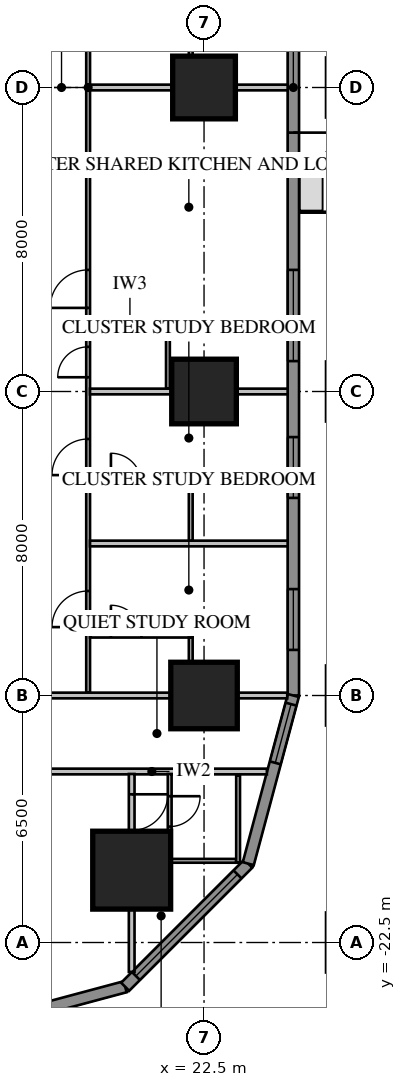
"""IFC4 building model, lengths in metres.
Left out: names, types, materials, properties, quantities, classifications, styles, units other than length and angle.
Written with IfcOpenShell. Run it as: python <this file> out.ifc"""

import sys

from ifc_helpers import new_model, si_unit, direction, frame, frame_2d, origin, origin_2d, place, context, subcontext, project, spatial, rectangle, extrude, element, fill, save


model = new_model("IFC4")
c1 = context("Model", 3, precision=1e-05, world=origin(), true_north=direction((0.0, 1.0)))
c2 = subcontext(c1, "Body", "Model", "MODEL_VIEW")
j1 = project(units=[si_unit("LENGTHUNIT", "METRE"), si_unit("PLANEANGLEUNIT", "RADIAN")], contexts=[c1])
p1 = place(None, origin())
s1 = spatial("IfcSite", under=j1, at=p1, CompositionType="ELEMENT")
p2 = place(p1, origin())
s2 = spatial("IfcBuilding", under=s1, at=p2, CompositionType="ELEMENT")
p3 = place(p2, frame((0.0, 0.0, 23.7)))
s3 = spatial("IfcBuildingStorey", under=s2, at=p3, CompositionType="ELEMENT", Elevation=23.7)
p4 = place(p3, frame((22.5, -16.0, 0.0), z_axis=(0.0, 0.0, 1.0), x_axis=(1.0, 0.0, 0.0)))
e1 = element("IfcColumn", 1, at=p4, inside=s3, PredefinedType="COLUMN", context=c2, shape_type="SweptSolid", body=[
    extrude(rectangle(XDim=1.75, YDim=1.75, at=origin_2d()), origin(), (0.0, 0.0, 1.0), 3.85),
])
p5 = place(p3, frame((22.5, -8.0, 0.0), z_axis=(0.0, 0.0, 1.0), x_axis=(1.0, 0.0, 0.0)))
e2 = element("IfcColumn", 2, at=p5, inside=s3, PredefinedType="COLUMN", context=c2, shape_type="SweptSolid", body=[
    extrude(rectangle(XDim=1.7, YDim=1.7, at=origin_2d()), origin(), (0.0, 0.0, 1.0), 3.85),
])
p6 = place(p3, frame((22.5, 0.0, 0.0), z_axis=(0.0, 0.0, 1.0), x_axis=(1.0, 0.0, 0.0)))
e3 = element("IfcColumn", 3, at=p6, inside=s3, PredefinedType="COLUMN", context=c2, shape_type="SweptSolid", body=[
    extrude(rectangle(XDim=1.65, YDim=1.65, at=origin_2d()), origin(), (0.0, 0.0, 1.0), 3.85),
])
p7 = place(p3, frame((20.596, -20.596, 0.0), z_axis=(0.0, 0.0, 1.0), x_axis=(1.0, 0.0, 0.0)))
e4 = element("IfcColumn", 4, at=p7, inside=s3, PredefinedType="COLUMN", context=c2, shape_type="SweptSolid", body=[
    extrude(rectangle(XDim=2.05, YDim=2.05, at=origin_2d()), origin(), (0.0, 0.0, 1.0), 3.85),
])
p8 = place(p3, frame((24.85, -16.0, 0.0), z_axis=(0.0, 0.0, 1.0), x_axis=(0.0, 1.0, 0.0)))
e5 = element("IfcWall", 5, at=p8, inside=s3, PredefinedType="SOLIDWALL", context=c2, shape_type="SweptSolid", body=[
    extrude(rectangle(XDim=32.0, YDim=0.3, at=frame_2d((16.0, 0.0))), origin(), (0.0, 0.0, 1.0), 3.65),
])
p9 = place(p8, frame((1.2, 0.0, 0.75)))
e6 = element("IfcOpeningElement", 6, at=p9, cuts=e5, PredefinedType="OPENING", context=c2, shape_type="SweptSolid", body=[
    extrude(rectangle(XDim=1.6, YDim=1.8, at=frame_2d((0.8, 0.9))), frame((0.0, 0.17, 0.0), z_axis=(0.0, -1.0, 0.0), x_axis=(1.0, 0.0, 0.0)), (0.0, 0.0, 1.0), 0.34),
])
p10 = place(p8, frame((5.2, 0.0, 0.75)))
e7 = element("IfcOpeningElement", 7, at=p10, cuts=e5, PredefinedType="OPENING", context=c2, shape_type="SweptSolid", body=[
    extrude(rectangle(XDim=1.6, YDim=1.8, at=frame_2d((0.8, 0.9))), frame((0.0, 0.17, 0.0), z_axis=(0.0, -1.0, 0.0), x_axis=(1.0, 0.0, 0.0)), (0.0, 0.0, 1.0), 0.34),
])
p11 = place(p8, frame((17.2, 0.0, 0.75)))
e8 = element("IfcOpeningElement", 8, at=p11, cuts=e5, PredefinedType="OPENING", context=c2, shape_type="SweptSolid", body=[
    extrude(rectangle(XDim=1.6, YDim=1.8, at=frame_2d((0.8, 0.9))), frame((0.0, 0.17, 0.0), z_axis=(0.0, -1.0, 0.0), x_axis=(1.0, 0.0, 0.0)), (0.0, 0.0, 1.0), 0.34),
])
p12 = place(p8, frame((21.2, 0.0, 0.75)))
e9 = element("IfcOpeningElement", 9, at=p12, cuts=e5, PredefinedType="OPENING", context=c2, shape_type="SweptSolid", body=[
    extrude(rectangle(XDim=1.6, YDim=1.8, at=frame_2d((0.8, 0.9))), frame((0.0, 0.17, 0.0), z_axis=(0.0, -1.0, 0.0), x_axis=(1.0, 0.0, 0.0)), (0.0, 0.0, 1.0), 0.34),
])
p13 = place(p8, frame((25.2, 0.0, 0.75)))
e10 = element("IfcOpeningElement", 10, at=p13, cuts=e5, PredefinedType="OPENING", context=c2, shape_type="SweptSolid", body=[
    extrude(rectangle(XDim=1.6, YDim=1.8, at=frame_2d((0.8, 0.9))), frame((0.0, 0.17, 0.0), z_axis=(0.0, -1.0, 0.0), x_axis=(1.0, 0.0, 0.0)), (0.0, 0.0, 1.0), 0.34),
])
p14 = place(p8, frame((29.2, 0.0, 0.75)))
e11 = element("IfcOpeningElement", 11, at=p14, cuts=e5, PredefinedType="OPENING", context=c2, shape_type="SweptSolid", body=[
    extrude(rectangle(XDim=1.6, YDim=1.8, at=frame_2d((0.8, 0.9))), frame((0.0, 0.17, 0.0), z_axis=(0.0, -1.0, 0.0), x_axis=(1.0, 0.0, 0.0)), (0.0, 0.0, 1.0), 0.34),
])
p15 = place(p8, frame((8.8, 0.0, 0.75)))
e12 = element("IfcOpeningElement", 12, at=p15, cuts=e5, PredefinedType="OPENING", context=c2, shape_type="SweptSolid", body=[
    extrude(rectangle(XDim=2.4, YDim=1.8, at=frame_2d((1.2, 0.9))), frame((0.0, 0.17, 0.0), z_axis=(0.0, -1.0, 0.0), x_axis=(1.0, 0.0, 0.0)), (0.0, 0.0, 1.0), 0.34),
])
p16 = place(p8, frame((13.812, 0.0, 0.0)))
e13 = element("IfcOpeningElement", 13, at=p16, cuts=e5, PredefinedType="OPENING", context=c2, shape_type="SweptSolid", body=[
    extrude(rectangle(XDim=1.0, YDim=2.4, at=frame_2d((0.5, 1.2))), frame((0.0, 0.17, 0.0), z_axis=(0.0, -1.0, 0.0), x_axis=(1.0, 0.0, 0.0)), (0.0, 0.0, 1.0), 0.34),
])
p17 = place(p3, frame((16.0, -24.85, 0.0), z_axis=(0.0, 0.0, 1.0), x_axis=(0.965920218567, 0.258839972501, 0.0)))
e14 = element("IfcWall", 14, at=p17, inside=s3, PredefinedType="SOLIDWALL", context=c2, shape_type="SweptSolid", body=[
    extrude(rectangle(XDim=4.581, YDim=0.3, at=frame_2d((2.291, 0.0))), origin(), (0.0, 0.0, 1.0), 3.65),
])
p18 = place(p3, frame((20.425, -23.664, 0.0), z_axis=(0.0, 0.0, 1.0), x_axis=(0.707106781187, 0.707106781187, 0.0)))
e15 = element("IfcWall", 15, at=p18, inside=s3, PredefinedType="SOLIDWALL", context=c2, shape_type="SweptSolid", body=[
    extrude(rectangle(XDim=4.581, YDim=0.3, at=frame_2d((2.291, 0.0))), origin(), (0.0, 0.0, 1.0), 3.65),
])
p19 = place(p18, frame((0.4, 0.0, 0.75)))
e16 = element("IfcOpeningElement", 16, at=p19, cuts=e15, PredefinedType="OPENING", context=c2, shape_type="SweptSolid", body=[
    extrude(rectangle(XDim=3.781, YDim=1.8, at=frame_2d((1.891, 0.9))), frame((0.0, 0.17, 0.0), z_axis=(0.0, -1.0, 0.0), x_axis=(1.0, 0.0, 0.0)), (0.0, 0.0, 1.0), 0.34),
])
p20 = place(p3, frame((23.664, -20.425, 0.0), z_axis=(0.0, 0.0, 1.0), x_axis=(0.258839972501, 0.965920218567, 0.0)))
e17 = element("IfcWall", 17, at=p20, inside=s3, PredefinedType="SOLIDWALL", context=c2, shape_type="SweptSolid", body=[
    extrude(rectangle(XDim=4.581, YDim=0.3, at=frame_2d((2.291, 0.0))), origin(), (0.0, 0.0, 1.0), 3.65),
])
p21 = place(p20, frame((2.746, 0.0, 0.75)))
e18 = element("IfcOpeningElement", 18, at=p21, cuts=e17, PredefinedType="OPENING", context=c2, shape_type="SweptSolid", body=[
    extrude(rectangle(XDim=1.6, YDim=1.8, at=frame_2d((0.8, 0.9))), frame((0.0, 0.17, 0.0), z_axis=(0.0, -1.0, 0.0), x_axis=(1.0, 0.0, 0.0)), (0.0, 0.0, 1.0), 0.34),
])
p22 = place(p3, frame((19.45, -15.925, 0.0), z_axis=(0.0, 0.0, 1.0), x_axis=(0.0, 1.0, 0.0)))
e19 = element("IfcWall", 19, at=p22, inside=s3, PredefinedType="PARTITIONING", context=c2, shape_type="SweptSolid", body=[
    extrude(rectangle(XDim=31.85, YDim=0.1, at=frame_2d((15.925, 0.0))), origin(), (0.0, 0.0, 1.0), 3.65),
])
p23 = place(p22, frame((10.125, 0.0, 0.0)))
e20 = element("IfcOpeningElement", 20, at=p23, cuts=e19, PredefinedType="OPENING", context=c2, shape_type="SweptSolid", body=[
    extrude(rectangle(XDim=1.0, YDim=2.1, at=frame_2d((0.5, 1.05))), frame((0.0, 0.07, 0.0), z_axis=(0.0, -1.0, 0.0), x_axis=(1.0, 0.0, 0.0)), (0.0, 0.0, 1.0), 0.14),
])
p24 = place(p22, frame((8.3, 0.0, 0.0)))
e21 = element("IfcOpeningElement", 21, at=p24, cuts=e19, PredefinedType="OPENING", context=c2, shape_type="SweptSolid", body=[
    extrude(rectangle(XDim=0.8, YDim=2.1, at=frame_2d((0.4, 1.05))), frame((0.0, 0.07, 0.0), z_axis=(0.0, -1.0, 0.0), x_axis=(1.0, 0.0, 0.0)), (0.0, 0.0, 1.0), 0.14),
])
p25 = place(p22, frame((1.725, 0.0, 0.0)))
e22 = element("IfcOpeningElement", 22, at=p25, cuts=e19, PredefinedType="OPENING", context=c2, shape_type="SweptSolid", body=[
    extrude(rectangle(XDim=0.95, YDim=2.1, at=frame_2d((0.475, 1.05))), frame((0.0, 0.07, 0.0), z_axis=(0.0, -1.0, 0.0), x_axis=(1.0, 0.0, 0.0)), (0.0, 0.0, 1.0), 0.14),
])
p26 = place(p22, frame((5.725, 0.0, 0.0)))
e23 = element("IfcOpeningElement", 23, at=p26, cuts=e19, PredefinedType="OPENING", context=c2, shape_type="SweptSolid", body=[
    extrude(rectangle(XDim=0.95, YDim=2.1, at=frame_2d((0.475, 1.05))), frame((0.0, 0.07, 0.0), z_axis=(0.0, -1.0, 0.0), x_axis=(1.0, 0.0, 0.0)), (0.0, 0.0, 1.0), 0.14),
])
p27 = place(p22, frame((17.725, 0.0, 0.0)))
e24 = element("IfcOpeningElement", 24, at=p27, cuts=e19, PredefinedType="OPENING", context=c2, shape_type="SweptSolid", body=[
    extrude(rectangle(XDim=0.95, YDim=2.1, at=frame_2d((0.475, 1.05))), frame((0.0, 0.07, 0.0), z_axis=(0.0, -1.0, 0.0), x_axis=(1.0, 0.0, 0.0)), (0.0, 0.0, 1.0), 0.14),
])
p28 = place(p22, frame((21.725, 0.0, 0.0)))
e25 = element("IfcOpeningElement", 25, at=p28, cuts=e19, PredefinedType="OPENING", context=c2, shape_type="SweptSolid", body=[
    extrude(rectangle(XDim=0.95, YDim=2.1, at=frame_2d((0.475, 1.05))), frame((0.0, 0.07, 0.0), z_axis=(0.0, -1.0, 0.0), x_axis=(1.0, 0.0, 0.0)), (0.0, 0.0, 1.0), 0.14),
])
p29 = place(p22, frame((25.725, 0.0, 0.0)))
e26 = element("IfcOpeningElement", 26, at=p29, cuts=e19, PredefinedType="OPENING", context=c2, shape_type="SweptSolid", body=[
    extrude(rectangle(XDim=0.95, YDim=2.1, at=frame_2d((0.475, 1.05))), frame((0.0, 0.07, 0.0), z_axis=(0.0, -1.0, 0.0), x_axis=(1.0, 0.0, 0.0)), (0.0, 0.0, 1.0), 0.14),
])
p30 = place(p22, frame((29.725, 0.0, 0.0)))
e27 = element("IfcOpeningElement", 27, at=p30, cuts=e19, PredefinedType="OPENING", context=c2, shape_type="SweptSolid", body=[
    extrude(rectangle(XDim=0.95, YDim=2.1, at=frame_2d((0.475, 1.05))), frame((0.0, 0.07, 0.0), z_axis=(0.0, -1.0, 0.0), x_axis=(1.0, 0.0, 0.0)), (0.0, 0.0, 1.0), 0.14),
])
p31 = place(p3, frame((19.5, -6.275, 0.0), z_axis=(0.0, 0.0, 1.0), x_axis=(1.0, 0.0, 0.0)))
e28 = element("IfcWall", 28, at=p31, inside=s3, PredefinedType="PARTITIONING", context=c2, shape_type="SweptSolid", body=[
    extrude(rectangle(XDim=2.1, YDim=0.1, at=frame_2d((1.05, 0.0))), origin(), (0.0, 0.0, 1.0), 3.65),
])
p32 = place(p3, frame((21.55, -7.925, 0.0), z_axis=(0.0, 0.0, 1.0), x_axis=(0.0, 1.0, 0.0)))
e29 = element("IfcWall", 29, at=p32, inside=s3, PredefinedType="PARTITIONING", context=c2, shape_type="SweptSolid", body=[
    extrude(rectangle(XDim=1.7, YDim=0.1, at=frame_2d((0.85, 0.0))), origin(), (0.0, 0.0, 1.0), 3.65),
])
p33 = place(p3, frame((18.1, -18.0, 0.0), z_axis=(0.0, 0.0, 1.0), x_axis=(1.0, 0.0, 0.0)))
e30 = element("IfcWall", 30, at=p33, inside=s3, PredefinedType="PARTITIONING", context=c2, shape_type="SweptSolid", body=[
    extrude(rectangle(XDim=6.053, YDim=0.15, at=frame_2d((3.027, 0.0))), origin(), (0.0, 0.0, 1.0), 3.65),
])
p34 = place(p3, frame((18.1, -16.0, 0.0), z_axis=(0.0, 0.0, 1.0), x_axis=(1.0, 0.0, 0.0)))
e31 = element("IfcWall", 31, at=p34, inside=s3, PredefinedType="PARTITIONING", context=c2, shape_type="SweptSolid", body=[
    extrude(rectangle(XDim=6.589, YDim=0.15, at=frame_2d((3.295, 0.0))), origin(), (0.0, 0.0, 1.0), 3.65),
])
for number, where, z_axis, x_axis in (
    (32, (19.5, -12.0, 0.0), (0.0, 0.0, 1.0), (1.0, 0.0, 0.0)),
    (33, (19.5, -8.0, 0.0), (0.0, 0.0, 1.0), (1.0, 0.0, 0.0)),
):
    element("IfcWall", number, at=place(p3, frame(where, z_axis=z_axis, x_axis=x_axis)), inside=s3, PredefinedType="PARTITIONING", context=c2, shape_type="SweptSolid", body=[
        extrude(rectangle(XDim=5.2, YDim=0.15, at=frame_2d((2.6, 0.0))), origin(), (0.0, 0.0, 1.0), 3.65),
    ])
p35 = place(p3, frame((19.5, 0.0, 0.0), z_axis=(0.0, 0.0, 1.0), x_axis=(1.0, 0.0, 0.0)))
e34 = element("IfcWall", 34, at=p35, inside=s3, PredefinedType="PARTITIONING", context=c2, shape_type="SweptSolid", body=[
    extrude(rectangle(XDim=5.2, YDim=0.15, at=frame_2d((2.6, 0.0))), origin(), (0.0, 0.0, 1.0), 2.957),
])
p36 = place(p3, frame((19.5, -14.425, 0.0), z_axis=(0.0, 0.0, 1.0), x_axis=(1.0, 0.0, 0.0)))
e35 = element("IfcWall", 35, at=p36, inside=s3, PredefinedType="PARTITIONING", context=c2, shape_type="SweptSolid", body=[
    extrude(rectangle(XDim=2.7, YDim=0.1, at=frame_2d((1.35, 0.0))), origin(), (0.0, 0.0, 1.0), 3.65),
])
p37 = place(p36, frame((0.55, 0.0, 0.0)))
e36 = element("IfcOpeningElement", 36, at=p37, cuts=e35, PredefinedType="OPENING", context=c2, shape_type="SweptSolid", body=[
    extrude(rectangle(XDim=0.8, YDim=2.1, at=frame_2d((0.4, 1.05))), frame((0.0, 0.07, 0.0), z_axis=(0.0, -1.0, 0.0), x_axis=(1.0, 0.0, 0.0)), (0.0, 0.0, 1.0), 0.14),
])
p38 = place(p3, frame((22.15, -15.925, 0.0), z_axis=(0.0, 0.0, 1.0), x_axis=(0.0, 1.0, 0.0)))
e37 = element("IfcWall", 37, at=p38, inside=s3, PredefinedType="PARTITIONING", context=c2, shape_type="SweptSolid", body=[
    extrude(rectangle(XDim=1.45, YDim=0.1, at=frame_2d((0.725, 0.0))), origin(), (0.0, 0.0, 1.0), 3.65),
])
p39 = place(p3, frame((19.5, -10.425, 0.0), z_axis=(0.0, 0.0, 1.0), x_axis=(1.0, 0.0, 0.0)))
e38 = element("IfcWall", 38, at=p39, inside=s3, PredefinedType="PARTITIONING", context=c2, shape_type="SweptSolid", body=[
    extrude(rectangle(XDim=2.7, YDim=0.1, at=frame_2d((1.35, 0.0))), origin(), (0.0, 0.0, 1.0), 3.65),
])
p40 = place(p39, frame((0.55, 0.0, 0.0)))
e39 = element("IfcOpeningElement", 39, at=p40, cuts=e38, PredefinedType="OPENING", context=c2, shape_type="SweptSolid", body=[
    extrude(rectangle(XDim=0.8, YDim=2.1, at=frame_2d((0.4, 1.05))), frame((0.0, 0.07, 0.0), z_axis=(0.0, -1.0, 0.0), x_axis=(1.0, 0.0, 0.0)), (0.0, 0.0, 1.0), 0.14),
])
for number, where, z_axis, x_axis in (
    (40, (22.15, -11.925, 0.0), (0.0, 0.0, 1.0), (0.0, 1.0, 0.0)),
    (41, (22.15, 0.075, 0.0), (0.0, 0.0, 1.0), (0.0, 1.0, 0.0)),
):
    element("IfcWall", number, at=place(p3, frame(where, z_axis=z_axis, x_axis=x_axis)), inside=s3, PredefinedType="PARTITIONING", context=c2, shape_type="SweptSolid", body=[
        extrude(rectangle(XDim=1.45, YDim=0.1, at=frame_2d((0.725, 0.0))), origin(), (0.0, 0.0, 1.0), 3.65),
    ])
p41 = place(p3, frame((21.596, -18.065, 0.0), z_axis=(0.0, 0.0, 1.0), x_axis=(0.0, -1.0, 0.0)))
e42 = element("IfcWall", 42, at=p41, inside=s3, PredefinedType="PARTITIONING", context=c2, shape_type="SweptSolid", body=[
    extrude(rectangle(XDim=2.335, YDim=0.1, at=frame_2d((1.167, 0.0))), origin(), (0.0, 0.0, 1.0), 3.65),
])
p42 = place(p41, frame((0.585, 0.0, 0.0)))
e43 = element("IfcOpeningElement", 43, at=p42, cuts=e42, PredefinedType="OPENING", context=c2, shape_type="SweptSolid", body=[
    extrude(rectangle(XDim=0.8, YDim=2.1, at=frame_2d((0.4, 1.05))), frame((0.0, 0.07, 0.0), z_axis=(0.0, -1.0, 0.0), x_axis=(1.0, 0.0, 0.0)), (0.0, 0.0, 1.0), 0.14),
])
p43 = place(p3, frame((21.646, -20.35, 0.0), z_axis=(0.0, 0.0, 1.0), x_axis=(1.0, 0.0, 0.0)))
e44 = element("IfcWall", 44, at=p43, inside=s3, PredefinedType="PARTITIONING", context=c2, shape_type="SweptSolid", body=[
    extrude(rectangle(XDim=1.7, YDim=0.1, at=frame_2d((0.85, 0.0))), origin(), (0.0, 0.0, 1.0), 3.65),
])
p44 = place(p3, frame((23.396, -18.1, 0.0), z_axis=(0.0, 0.0, 1.0), x_axis=(0.0, -1.0, 0.0)))
e45 = element("IfcWall", 45, at=p44, inside=s3, PredefinedType="PARTITIONING", context=c2, shape_type="SweptSolid", body=[
    extrude(rectangle(XDim=2.3, YDim=0.1, at=frame_2d((1.15, 0.0))), origin(), (0.0, 0.0, 1.0), 3.65),
])
p45 = place(p3, frame((20.596, -18.065, 0.0), z_axis=(0.0, 0.0, 1.0), x_axis=(0.0, -1.0, 0.0)))
e46 = element("IfcWall", 46, at=p45, inside=s3, PredefinedType="PARTITIONING", context=c2, shape_type="SweptSolid", body=[
    extrude(rectangle(XDim=5.209, YDim=0.15, at=frame_2d((2.604, 0.0))), origin(), (0.0, 0.0, 1.0), 3.65),
])
p46 = place(p45, frame((0.535, 0.0, 0.0)))
e47 = element("IfcOpeningElement", 47, at=p46, cuts=e46, PredefinedType="OPENING", context=c2, shape_type="SweptSolid", body=[
    extrude(rectangle(XDim=0.95, YDim=2.1, at=frame_2d((0.475, 1.05))), frame((0.0, 0.095, 0.0), z_axis=(0.0, -1.0, 0.0), x_axis=(1.0, 0.0, 0.0)), (0.0, 0.0, 1.0), 0.19),
])
p47 = place(p21, origin())
e48 = element("IfcWindow", 48, at=p47, inside=s3, PartitioningType="SINGLE_PANEL", PredefinedType="WINDOW", context=c2, shape_type="SweptSolid", body=[
    extrude(rectangle(XDim=1.6, YDim=1.8, at=frame_2d((0.8, 0.9))), frame((0.0, 0.03, 0.0), z_axis=(0.0, -1.0, 0.0), x_axis=(1.0, 0.0, 0.0)), (0.0, 0.0, 1.0), 0.06),
])
fill(e18, e48)
p48 = place(p9, origin())
e49 = element("IfcWindow", 49, at=p48, inside=s3, PartitioningType="SINGLE_PANEL", PredefinedType="WINDOW", context=c2, shape_type="SweptSolid", body=[
    extrude(rectangle(XDim=1.6, YDim=1.8, at=frame_2d((0.8, 0.9))), frame((0.0, 0.03, 0.0), z_axis=(0.0, -1.0, 0.0), x_axis=(1.0, 0.0, 0.0)), (0.0, 0.0, 1.0), 0.06),
])
fill(e6, e49)
p49 = place(p10, origin())
e50 = element("IfcWindow", 50, at=p49, inside=s3, PartitioningType="SINGLE_PANEL", PredefinedType="WINDOW", context=c2, shape_type="SweptSolid", body=[
    extrude(rectangle(XDim=1.6, YDim=1.8, at=frame_2d((0.8, 0.9))), frame((0.0, 0.03, 0.0), z_axis=(0.0, -1.0, 0.0), x_axis=(1.0, 0.0, 0.0)), (0.0, 0.0, 1.0), 0.06),
])
fill(e7, e50)
p50 = place(p15, origin())
e51 = element("IfcWindow", 51, at=p50, inside=s3, PartitioningType="SINGLE_PANEL", PredefinedType="WINDOW", context=c2, shape_type="SweptSolid", body=[
    extrude(rectangle(XDim=2.4, YDim=1.8, at=frame_2d((1.2, 0.9))), frame((0.0, 0.03, 0.0), z_axis=(0.0, -1.0, 0.0), x_axis=(1.0, 0.0, 0.0)), (0.0, 0.0, 1.0), 0.06),
])
fill(e12, e51)
p51 = place(p19, origin())
e52 = element("IfcWindow", 52, at=p51, inside=s3, PartitioningType="SINGLE_PANEL", PredefinedType="WINDOW", context=c2, shape_type="SweptSolid", body=[
    extrude(rectangle(XDim=3.781, YDim=1.8, at=frame_2d((1.891, 0.9))), frame((0.0, 0.03, 0.0), z_axis=(0.0, -1.0, 0.0), x_axis=(1.0, 0.0, 0.0)), (0.0, 0.0, 1.0), 0.06),
])
fill(e16, e52)
p52 = place(p16, origin())
e53 = element("IfcDoor", 53, at=p52, inside=s3, OperationType="SINGLE_SWING_RIGHT", PredefinedType="DOOR", context=c2, shape_type="SweptSolid", body=[
    extrude(rectangle(XDim=1.0, YDim=2.4, at=frame_2d((0.5, 1.2))), frame((0.0, 0.025, 0.0), z_axis=(0.0, -1.0, 0.0), x_axis=(1.0, 0.0, 0.0)), (0.0, 0.0, 1.0), 0.05),
])
fill(e13, e53)
p53 = place(p23, origin())
e54 = element("IfcDoor", 54, at=p53, inside=s3, OperationType="SINGLE_SWING_LEFT", PredefinedType="DOOR", context=c2, shape_type="SweptSolid", body=[
    extrude(rectangle(XDim=1.0, YDim=2.1, at=frame_2d((0.5, 1.05))), frame((0.0, 0.025, 0.0), z_axis=(0.0, -1.0, 0.0), x_axis=(1.0, 0.0, 0.0)), (0.0, 0.0, 1.0), 0.05),
])
fill(e20, e54)
p54 = place(p24, origin())
e55 = element("IfcDoor", 55, at=p54, inside=s3, OperationType="SINGLE_SWING_LEFT", PredefinedType="DOOR", context=c2, shape_type="SweptSolid", body=[
    extrude(rectangle(XDim=0.8, YDim=2.1, at=frame_2d((0.4, 1.05))), frame((0.0, 0.025, 0.0), z_axis=(0.0, -1.0, 0.0), x_axis=(1.0, 0.0, 0.0)), (0.0, 0.0, 1.0), 0.05),
])
fill(e21, e55)
p55 = place(p25, origin())
e56 = element("IfcDoor", 56, at=p55, inside=s3, OperationType="SINGLE_SWING_LEFT", PredefinedType="DOOR", context=c2, shape_type="SweptSolid", body=[
    extrude(rectangle(XDim=0.95, YDim=2.1, at=frame_2d((0.475, 1.05))), frame((0.0, 0.025, 0.0), z_axis=(0.0, -1.0, 0.0), x_axis=(1.0, 0.0, 0.0)), (0.0, 0.0, 1.0), 0.05),
])
fill(e22, e56)
p56 = place(p37, origin())
e57 = element("IfcDoor", 57, at=p56, inside=s3, OperationType="SINGLE_SWING_LEFT", PredefinedType="DOOR", context=c2, shape_type="SweptSolid", body=[
    extrude(rectangle(XDim=0.8, YDim=2.1, at=frame_2d((0.4, 1.05))), frame((0.0, 0.025, 0.0), z_axis=(0.0, -1.0, 0.0), x_axis=(1.0, 0.0, 0.0)), (0.0, 0.0, 1.0), 0.05),
])
fill(e36, e57)
p57 = place(p26, origin())
e58 = element("IfcDoor", 58, at=p57, inside=s3, OperationType="SINGLE_SWING_LEFT", PredefinedType="DOOR", context=c2, shape_type="SweptSolid", body=[
    extrude(rectangle(XDim=0.95, YDim=2.1, at=frame_2d((0.475, 1.05))), frame((0.0, 0.025, 0.0), z_axis=(0.0, -1.0, 0.0), x_axis=(1.0, 0.0, 0.0)), (0.0, 0.0, 1.0), 0.05),
])
fill(e23, e58)
p58 = place(p40, origin())
e59 = element("IfcDoor", 59, at=p58, inside=s3, OperationType="SINGLE_SWING_LEFT", PredefinedType="DOOR", context=c2, shape_type="SweptSolid", body=[
    extrude(rectangle(XDim=0.8, YDim=2.1, at=frame_2d((0.4, 1.05))), frame((0.0, 0.025, 0.0), z_axis=(0.0, -1.0, 0.0), x_axis=(1.0, 0.0, 0.0)), (0.0, 0.0, 1.0), 0.05),
])
fill(e39, e59)
p59 = place(p42, origin())
e60 = element("IfcDoor", 60, at=p59, inside=s3, OperationType="SINGLE_SWING_LEFT", PredefinedType="DOOR", context=c2, shape_type="SweptSolid", body=[
    extrude(rectangle(XDim=0.8, YDim=2.1, at=frame_2d((0.4, 1.05))), frame((0.0, 0.025, 0.0), z_axis=(0.0, -1.0, 0.0), x_axis=(1.0, 0.0, 0.0)), (0.0, 0.0, 1.0), 0.05),
])
fill(e43, e60)
p60 = place(p46, origin())
e61 = element("IfcDoor", 61, at=p60, inside=s3, OperationType="SINGLE_SWING_LEFT", PredefinedType="DOOR", context=c2, shape_type="SweptSolid", body=[
    extrude(rectangle(XDim=0.95, YDim=2.1, at=frame_2d((0.475, 1.05))), frame((0.0, 0.025, 0.0), z_axis=(0.0, -1.0, 0.0), x_axis=(1.0, 0.0, 0.0)), (0.0, 0.0, 1.0), 0.05),
])
fill(e47, e61)
save(model, sys.argv[1])
